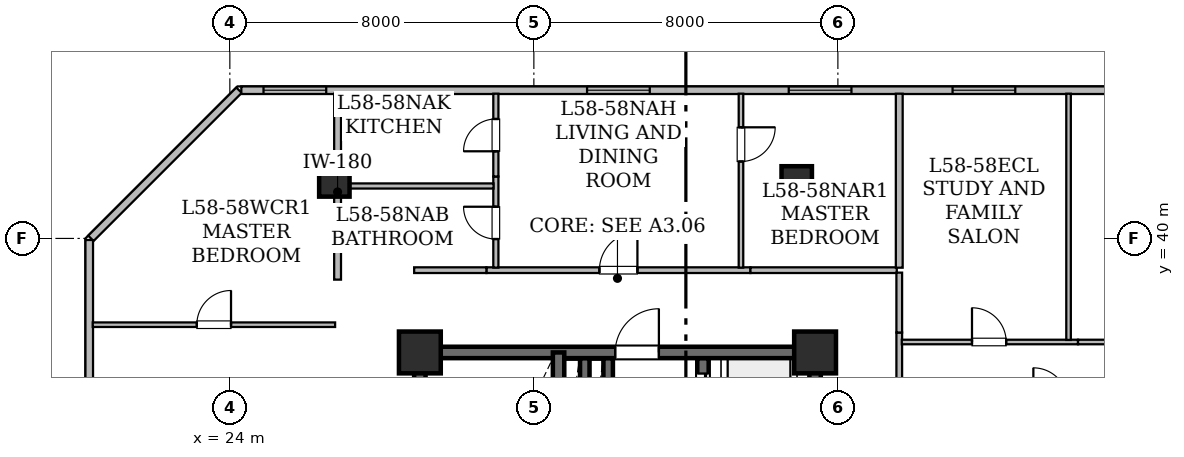
"""IFC4 building model, lengths in metres.
Left out: names, types, materials, properties, quantities, classifications, styles, units other than length and angle.
Written with IfcOpenShell. Run it as: python <this file> out.ifc"""

import sys

from ifc_helpers import new_model, si_unit, direction, frame, frame_2d, origin, origin_2d, place, context, subcontext, project, spatial, rectangle, hollow_rectangle, extrude, element, fill, save


model = new_model("IFC4")
c1 = context("Model", 3, precision=1e-05, world=origin(), true_north=direction((0.0, 1.0)))
c2 = subcontext(c1, "Body", "Model", "MODEL_VIEW")
j1 = project(units=[si_unit("LENGTHUNIT", "METRE"), si_unit("PLANEANGLEUNIT", "RADIAN")], contexts=[c1])
p1 = place(None, origin())
s1 = spatial("IfcSite", under=j1, at=p1, CompositionType="ELEMENT")
p2 = place(p1, origin())
s2 = spatial("IfcBuilding", under=s1, at=p2, CompositionType="ELEMENT")
p3 = place(p2, frame((0.0, 0.0, 228.15)))
s3 = spatial("IfcBuildingStorey", under=s2, at=p3, CompositionType="ELEMENT", Elevation=228.15)
for number, where, z_axis, x_axis in (
    (1, (29.0, 37.0, 0.0), (0.0, 0.0, 1.0), (1.0, 0.0, 0.0)),
    (2, (39.4, 37.0, 0.0), (0.0, 0.0, 1.0), (1.0, 0.0, 0.0)),
):
    element("IfcColumn", number, at=place(p3, frame(where, z_axis=z_axis, x_axis=x_axis)), inside=s3, PredefinedType="COLUMN", context=c2, shape_type="SweptSolid", body=[
        extrude(hollow_rectangle(XDim=1.1, YDim=1.1, WallThickness=0.055, at=origin_2d()), origin(), (0.0, 0.0, 1.0), 3.625),
    ])
for number, where, z_axis, x_axis in (
    (3, (26.75, 41.5, 0.0), (0.0, 0.0, 1.0), (1.0, 0.0, 0.0)),
    (4, (38.917, 41.5, 0.0), (0.0, 0.0, 1.0), (1.0, 0.0, 0.0)),
):
    element("IfcColumn", number, at=place(p3, frame(where, z_axis=z_axis, x_axis=x_axis)), inside=s3, PredefinedType="COLUMN", context=c2, shape_type="SweptSolid", body=[
        extrude(hollow_rectangle(XDim=0.8, YDim=0.8, WallThickness=0.04, at=origin_2d()), origin(), (0.0, 0.0, 1.0), 3.65),
    ])
p4 = place(p3, frame((20.3, 31.084, 0.0), z_axis=(0.0, 0.0, 1.0), x_axis=(0.0, 1.0, 0.0)))
e5 = element("IfcWall", 5, at=p4, inside=s3, PredefinedType="STANDARD", context=c2, shape_type="SweptSolid", body=[
    extrude(rectangle(XDim=8.875, YDim=0.2, at=frame_2d((4.438, 0.0))), origin(), (0.0, 0.0, 1.0), 3.43),
])
p5 = place(p4, frame((2.89, 0.0, 0.85)))
e6 = element("IfcOpeningElement", 6, at=p5, cuts=e5, PredefinedType="OPENING", context=c2, shape_type="SweptSolid", body=[
    extrude(rectangle(XDim=1.65, YDim=1.55, at=frame_2d((0.825, 0.775))), frame((0.0, 0.11, 0.0), z_axis=(0.0, -1.0, 0.0), x_axis=(1.0, 0.0, 0.0)), (0.0, 0.0, 1.0), 0.22),
])
p6 = place(p3, frame((20.344, 40.003, 0.0), z_axis=(0.0, 0.0, 1.0), x_axis=(0.707106781187, 0.707106781187, 0.0)))
e7 = element("IfcWall", 7, at=p6, inside=s3, PredefinedType="STANDARD", context=c2, shape_type="SweptSolid", body=[
    extrude(rectangle(XDim=5.511, YDim=0.2, at=frame_2d((2.756, 0.0))), origin(), (0.0, 0.0, 1.0), 3.43),
])
p7 = place(p3, frame((24.302, 43.9, 0.0), z_axis=(0.0, 0.0, 1.0), x_axis=(1.0, 0.0, 0.0)))
e8 = element("IfcWall", 8, at=p7, inside=s3, PredefinedType="STANDARD", context=c2, shape_type="SweptSolid", body=[
    extrude(rectangle(XDim=41.457, YDim=0.2, at=frame_2d((20.729, 0.0))), origin(), (0.0, 0.0, 1.0), 3.43),
])
p8 = place(p7, frame((0.584, 0.0, 0.85)))
e9 = element("IfcOpeningElement", 9, at=p8, cuts=e8, PredefinedType="OPENING", context=c2, shape_type="SweptSolid", body=[
    extrude(rectangle(XDim=1.65, YDim=1.55, at=frame_2d((0.825, 0.775))), frame((0.0, 0.11, 0.0), z_axis=(0.0, -1.0, 0.0), x_axis=(1.0, 0.0, 0.0)), (0.0, 0.0, 1.0), 0.22),
])
p9 = place(p7, frame((9.098, 0.0, 0.85)))
e10 = element("IfcOpeningElement", 10, at=p9, cuts=e8, PredefinedType="OPENING", context=c2, shape_type="SweptSolid", body=[
    extrude(rectangle(XDim=1.65, YDim=1.55, at=frame_2d((0.825, 0.775))), frame((0.0, 0.11, 0.0), z_axis=(0.0, -1.0, 0.0), x_axis=(1.0, 0.0, 0.0)), (0.0, 0.0, 1.0), 0.22),
])
p10 = place(p7, frame((14.405, 0.0, 0.85)))
e11 = element("IfcOpeningElement", 11, at=p10, cuts=e8, PredefinedType="OPENING", context=c2, shape_type="SweptSolid", body=[
    extrude(rectangle(XDim=1.65, YDim=1.55, at=frame_2d((0.825, 0.775))), frame((0.0, 0.11, 0.0), z_axis=(0.0, -1.0, 0.0), x_axis=(1.0, 0.0, 0.0)), (0.0, 0.0, 1.0), 0.22),
])
p11 = place(p7, frame((18.716, 0.0, 0.85)))
e12 = element("IfcOpeningElement", 12, at=p11, cuts=e8, PredefinedType="OPENING", context=c2, shape_type="SweptSolid", body=[
    extrude(rectangle(XDim=1.65, YDim=1.55, at=frame_2d((0.825, 0.775))), frame((0.0, 0.11, 0.0), z_axis=(0.0, -1.0, 0.0), x_axis=(1.0, 0.0, 0.0)), (0.0, 0.0, 1.0), 0.22),
])
p12 = place(p7, frame((23.643, 0.0, 0.85)))
e13 = element("IfcOpeningElement", 13, at=p12, cuts=e8, PredefinedType="OPENING", context=c2, shape_type="SweptSolid", body=[
    extrude(rectangle(XDim=1.65, YDim=1.55, at=frame_2d((0.825, 0.775))), frame((0.0, 0.11, 0.0), z_axis=(0.0, -1.0, 0.0), x_axis=(1.0, 0.0, 0.0)), (0.0, 0.0, 1.0), 0.22),
])
p13 = place(p7, frame((29.548, 0.0, 0.85)))
e14 = element("IfcOpeningElement", 14, at=p13, cuts=e8, PredefinedType="OPENING", context=c2, shape_type="SweptSolid", body=[
    extrude(rectangle(XDim=1.65, YDim=1.55, at=frame_2d((0.825, 0.775))), frame((0.0, 0.11, 0.0), z_axis=(0.0, -1.0, 0.0), x_axis=(1.0, 0.0, 0.0)), (0.0, 0.0, 1.0), 0.22),
])
p14 = place(p7, frame((36.3, 0.0, 0.85)))
e15 = element("IfcOpeningElement", 15, at=p14, cuts=e8, PredefinedType="OPENING", context=c2, shape_type="SweptSolid", body=[
    extrude(rectangle(XDim=1.65, YDim=1.55, at=frame_2d((0.825, 0.775))), frame((0.0, 0.11, 0.0), z_axis=(0.0, -1.0, 0.0), x_axis=(1.0, 0.0, 0.0)), (0.0, 0.0, 1.0), 0.22),
])
p15 = place(p3, frame((29.0, 28.0, 0.0), z_axis=(0.0, 0.0, 1.0), x_axis=(0.0, 1.0, 0.0)))
e16 = element("IfcWall", 16, at=p15, inside=s3, PredefinedType="SHEAR", context=c2, shape_type="SweptSolid", body=[
    extrude(rectangle(XDim=9.0, YDim=0.3, at=frame_2d((4.5, 0.0))), origin(), (0.0, 0.0, 1.0), 3.43),
])
p16 = place(p3, frame((29.0, 37.0, 0.0), z_axis=(0.0, 0.0, 1.0), x_axis=(1.0, 0.0, 0.0)))
e17 = element("IfcWall", 17, at=p16, inside=s3, PredefinedType="SHEAR", context=c2, shape_type="SweptSolid", body=[
    extrude(rectangle(XDim=10.4, YDim=0.3, at=frame_2d((5.2, 0.0))), origin(), (0.0, 0.0, 1.0), 3.43),
])
p17 = place(p16, frame((5.14, 0.0, 0.0)))
e18 = element("IfcOpeningElement", 18, at=p17, cuts=e17, PredefinedType="OPENING", context=c2, shape_type="SweptSolid", body=[
    extrude(rectangle(XDim=1.15, YDim=2.2, at=frame_2d((0.575, 1.1))), frame((0.0, 0.16, 0.0), z_axis=(0.0, -1.0, 0.0), x_axis=(1.0, 0.0, 0.0)), (0.0, 0.0, 1.0), 0.32),
])
p18 = place(p3, frame((39.4, 24.4, 0.0), z_axis=(0.0, 0.0, 1.0), x_axis=(0.0, 1.0, 0.0)))
e19 = element("IfcWall", 19, at=p18, inside=s3, PredefinedType="SHEAR", context=c2, shape_type="SweptSolid", body=[
    extrude(rectangle(XDim=12.6, YDim=0.3, at=frame_2d((6.3, 0.0))), origin(), (0.0, 0.0, 1.0), 3.43),
])
p19 = place(p3, frame((32.65, 28.0, 0.0), z_axis=(0.0, 0.0, 1.0), x_axis=(0.0, 1.0, 0.0)))
e20 = element("IfcWall", 20, at=p19, inside=s3, PredefinedType="SHEAR", context=c2, shape_type="SweptSolid", body=[
    extrude(rectangle(XDim=9.0, YDim=0.3, at=frame_2d((4.5, 0.0))), origin(), (0.0, 0.0, 1.0), 3.43),
])
p20 = place(p19, frame((0.72, 0.0, 0.0)))
e21 = element("IfcOpeningElement", 21, at=p20, cuts=e20, PredefinedType="OPENING", context=c2, shape_type="SweptSolid", body=[
    extrude(rectangle(XDim=1.0, YDim=2.15, at=frame_2d((0.5, 1.075))), frame((0.0, 0.16, 0.0), z_axis=(0.0, -1.0, 0.0), x_axis=(1.0, 0.0, 0.0)), (0.0, 0.0, 1.0), 0.32),
])
p21 = place(p3, frame((36.45, 31.3, 0.0), z_axis=(0.0, 0.0, 1.0), x_axis=(0.0, 1.0, 0.0)))
e22 = element("IfcWall", 22, at=p21, inside=s3, PredefinedType="SHEAR", context=c2, shape_type="SweptSolid", body=[
    extrude(rectangle(XDim=5.546, YDim=0.3, at=frame_2d((2.773, 0.0))), origin(), (0.0, 0.0, 1.0), 3.43),
])
p22 = place(p21, frame((0.12, 0.0, 0.0)))
e23 = element("IfcOpeningElement", 23, at=p22, cuts=e22, PredefinedType="OPENING", context=c2, shape_type="SweptSolid", body=[
    extrude(rectangle(XDim=1.05, YDim=2.15, at=frame_2d((0.525, 1.075))), frame((0.0, 0.16, 0.0), z_axis=(0.0, -1.0, 0.0), x_axis=(1.0, 0.0, 0.0)), (0.0, 0.0, 1.0), 0.32),
])
p23 = place(p21, frame((2.075, 0.0, 0.0)))
e24 = element("IfcOpeningElement", 24, at=p23, cuts=e22, PredefinedType="OPENING", context=c2, shape_type="SweptSolid", body=[
    extrude(rectangle(XDim=1.05, YDim=2.15, at=frame_2d((0.525, 1.075))), frame((0.0, 0.16, 0.0), z_axis=(0.0, -1.0, 0.0), x_axis=(1.0, 0.0, 0.0)), (0.0, 0.0, 1.0), 0.32),
])
p24 = place(p21, frame((4.095, 0.0, 0.0)))
e25 = element("IfcOpeningElement", 25, at=p24, cuts=e22, PredefinedType="OPENING", context=c2, shape_type="SweptSolid", body=[
    extrude(rectangle(XDim=1.05, YDim=2.15, at=frame_2d((0.525, 1.075))), frame((0.0, 0.16, 0.0), z_axis=(0.0, -1.0, 0.0), x_axis=(1.0, 0.0, 0.0)), (0.0, 0.0, 1.0), 0.32),
])
p25 = place(p3, frame((33.955, 34.025, 0.0), z_axis=(0.0, 0.0, 1.0), x_axis=(0.0, 1.0, 0.0)))
e26 = element("IfcWall", 26, at=p25, inside=s3, PredefinedType="SHEAR", context=c2, shape_type="SweptSolid", body=[
    extrude(rectangle(XDim=2.821, YDim=0.25, at=frame_2d((1.411, 0.0))), origin(), (0.0, 0.0, 1.0), 3.43),
])
p26 = place(p3, frame((33.34, 34.279, 0.0), z_axis=(0.0, 0.0, 1.0), x_axis=(0.0, 1.0, 0.0)))
e27 = element("IfcWall", 27, at=p26, inside=s3, PredefinedType="SHEAR", context=c2, shape_type="SweptSolid", body=[
    extrude(rectangle(XDim=2.567, YDim=0.25, at=frame_2d((1.283, 0.0))), origin(), (0.0, 0.0, 1.0), 3.43),
])
p27 = place(p3, frame((30.751, 39.165, 0.0), z_axis=(0.0, 0.0, 1.0), x_axis=(1.0, 0.0, 0.0)))
e28 = element("IfcWall", 28, at=p27, inside=s3, PredefinedType="STANDARD", context=c2, shape_type="SweptSolid", body=[
    extrude(rectangle(XDim=6.948, YDim=0.15, at=frame_2d((3.474, 0.0))), origin(), (0.0, 0.0, 1.0), 3.43),
])
p28 = place(p27, frame((2.974, 0.0, 0.0)))
e29 = element("IfcOpeningElement", 29, at=p28, cuts=e28, PredefinedType="OPENING", context=c2, shape_type="SweptSolid", body=[
    extrude(rectangle(XDim=1.0, YDim=2.15, at=frame_2d((0.5, 1.075))), frame((0.0, 0.085, 0.0), z_axis=(0.0, -1.0, 0.0), x_axis=(1.0, 0.0, 0.0)), (0.0, 0.0, 1.0), 0.17),
])
p29 = place(p3, frame((28.85, 39.165, 0.0), z_axis=(0.0, 0.0, 1.0), x_axis=(1.0, 0.0, 0.0)))
e30 = element("IfcWall", 30, at=p29, inside=s3, PredefinedType="STANDARD", context=c2, shape_type="SweptSolid", body=[
    extrude(rectangle(XDim=1.901, YDim=0.15, at=frame_2d((0.95, 0.0))), origin(), (0.0, 0.0, 1.0), 3.43),
])
p30 = place(p3, frame((37.699, 39.165, 0.0), z_axis=(0.0, 0.0, 1.0), x_axis=(1.0, 0.0, 0.0)))
e31 = element("IfcWall", 31, at=p30, inside=s3, PredefinedType="STANDARD", context=c2, shape_type="SweptSolid", body=[
    extrude(rectangle(XDim=3.851, YDim=0.15, at=frame_2d((1.926, 0.0))), origin(), (0.0, 0.0, 1.0), 2.725),
])
p31 = place(p3, frame((41.615, 37.524, 0.0), z_axis=(0.0, 0.0, 1.0), x_axis=(0.0, -1.0, 0.0)))
e32 = element("IfcWall", 32, at=p31, inside=s3, PredefinedType="STANDARD", context=c2, shape_type="SweptSolid", body=[
    extrude(rectangle(XDim=1.58, YDim=0.15, at=frame_2d((0.79, 0.0))), origin(), (0.0, 0.0, 1.0), 2.725),
])
p32 = place(p3, frame((41.615, 39.1, 0.0), z_axis=(0.0, 0.0, 1.0), x_axis=(0.0, -1.0, 0.0)))
e33 = element("IfcWall", 33, at=p32, inside=s3, PredefinedType="STANDARD", context=c2, shape_type="SweptSolid", body=[
    extrude(rectangle(XDim=1.576, YDim=0.15, at=frame_2d((0.788, 0.0))), origin(), (0.0, 0.0, 1.0), 2.725),
])
p33 = place(p3, frame((20.392, 37.73, 0.0), z_axis=(0.0, 0.0, 1.0), x_axis=(1.0, 0.0, 0.0)))
e34 = element("IfcWall", 34, at=p33, inside=s3, PredefinedType="PARTITIONING", context=c2, shape_type="SweptSolid", body=[
    extrude(rectangle(XDim=6.378, YDim=0.12, at=frame_2d((3.189, 0.0))), origin(), (0.0, 0.0, 1.0), 2.887),
])
p34 = place(p33, frame((2.739, 0.0, 0.0)))
e35 = element("IfcOpeningElement", 35, at=p34, cuts=e34, PredefinedType="OPENING", context=c2, shape_type="SweptSolid", body=[
    extrude(rectangle(XDim=0.9, YDim=2.1, at=frame_2d((0.45, 1.05))), frame((0.0, 0.07, 0.0), z_axis=(0.0, -1.0, 0.0), x_axis=(1.0, 0.0, 0.0)), (0.0, 0.0, 1.0), 0.14),
])
p35 = place(p3, frame((26.835, 41.629, 0.0), z_axis=(0.0, 0.0, 1.0), x_axis=(0.0, -1.0, 0.0)))
e36 = element("IfcWall", 36, at=p35, inside=s3, PredefinedType="STANDARD", context=c2, shape_type="SweptSolid", body=[
    extrude(rectangle(XDim=2.713, YDim=0.18, at=frame_2d((1.356, 0.0))), origin(), (0.0, 0.0, 1.0), 2.725),
])
p36 = place(p3, frame((26.835, 43.808, 0.0), z_axis=(0.0, 0.0, 1.0), x_axis=(0.0, -1.0, 0.0)))
e37 = element("IfcWall", 37, at=p36, inside=s3, PredefinedType="STANDARD", context=c2, shape_type="SweptSolid", body=[
    extrude(rectangle(XDim=2.179, YDim=0.18, at=frame_2d((1.09, 0.0))), origin(), (0.0, 0.0, 1.0), 2.725),
])
p37 = place(p3, frame((31.0, 39.232, 0.0), z_axis=(0.0, 0.0, 1.0), x_axis=(0.0, 1.0, 0.0)))
e38 = element("IfcWall", 38, at=p37, inside=s3, PredefinedType="PARTITIONING", context=c2, shape_type="SweptSolid", body=[
    extrude(rectangle(XDim=2.397, YDim=0.135, at=frame_2d((1.198, 0.0))), origin(), (0.0, 0.0, 1.0), 2.887),
])
p38 = place(p37, frame((0.752, 0.0, 0.0)))
e39 = element("IfcOpeningElement", 39, at=p38, cuts=e38, PredefinedType="OPENING", context=c2, shape_type="SweptSolid", body=[
    extrude(rectangle(XDim=0.85, YDim=2.1, at=frame_2d((0.425, 1.05))), frame((0.0, 0.077, 0.0), z_axis=(0.0, -1.0, 0.0), x_axis=(1.0, 0.0, 0.0)), (0.0, 0.0, 1.0), 0.155),
])
p39 = place(p3, frame((31.0, 41.629, 0.0), z_axis=(0.0, 0.0, 1.0), x_axis=(0.0, 1.0, 0.0)))
e40 = element("IfcWall", 40, at=p39, inside=s3, PredefinedType="PARTITIONING", context=c2, shape_type="SweptSolid", body=[
    extrude(rectangle(XDim=2.179, YDim=0.135, at=frame_2d((1.09, 0.0))), origin(), (0.0, 0.0, 1.0), 3.43),
])
p40 = place(p39, frame((0.664, 0.0, 0.0)))
e41 = element("IfcOpeningElement", 41, at=p40, cuts=e40, PredefinedType="OPENING", context=c2, shape_type="SweptSolid", body=[
    extrude(rectangle(XDim=0.85, YDim=2.1, at=frame_2d((0.425, 1.05))), frame((0.0, 0.077, 0.0), z_axis=(0.0, -1.0, 0.0), x_axis=(1.0, 0.0, 0.0)), (0.0, 0.0, 1.0), 0.155),
])
p41 = place(p3, frame((37.45, 43.808, 0.0), z_axis=(0.0, 0.0, 1.0), x_axis=(0.0, -1.0, 0.0)))
e42 = element("IfcWall", 42, at=p41, inside=s3, PredefinedType="PARTITIONING", context=c2, shape_type="SweptSolid", body=[
    extrude(rectangle(XDim=4.576, YDim=0.12, at=frame_2d((2.288, 0.0))), origin(), (0.0, 0.0, 1.0), 2.887),
])
p42 = place(p41, frame((0.884, 0.0, 0.0)))
e43 = element("IfcOpeningElement", 43, at=p42, cuts=e42, PredefinedType="OPENING", context=c2, shape_type="SweptSolid", body=[
    extrude(rectangle(XDim=0.9, YDim=2.1, at=frame_2d((0.45, 1.05))), frame((0.0, 0.07, 0.0), z_axis=(0.0, -1.0, 0.0), x_axis=(1.0, 0.0, 0.0)), (0.0, 0.0, 1.0), 0.14),
])
p43 = place(p3, frame((26.917, 41.38, 0.0), z_axis=(0.0, 0.0, 1.0), x_axis=(1.0, 0.0, 0.0)))
e44 = element("IfcWall", 44, at=p43, inside=s3, PredefinedType="PARTITIONING", context=c2, shape_type="SweptSolid", body=[
    extrude(rectangle(XDim=4.022, YDim=0.135, at=frame_2d((2.011, 0.0))), origin(), (0.0, 0.0, 1.0), 2.725),
])
p44 = place(p3, frame((41.615, 43.808, 0.0), z_axis=(0.0, 0.0, 1.0), x_axis=(0.0, -1.0, 0.0)))
e45 = element("IfcWall", 45, at=p44, inside=s3, PredefinedType="STANDARD", context=c2, shape_type="SweptSolid", body=[
    extrude(rectangle(XDim=4.578, YDim=0.18, at=frame_2d((2.289, 0.0))), origin(), (0.0, 0.0, 1.0), 2.887),
])
p45 = place(p3, frame((41.682, 37.275, 0.0), z_axis=(0.0, 0.0, 1.0), x_axis=(1.0, 0.0, 0.0)))
e46 = element("IfcWall", 46, at=p45, inside=s3, PredefinedType="PARTITIONING", context=c2, shape_type="SweptSolid", body=[
    extrude(rectangle(XDim=4.637, YDim=0.12, at=frame_2d((2.319, 0.0))), origin(), (0.0, 0.0, 1.0), 2.725),
])
p46 = place(p45, frame((1.847, 0.0, 0.0)))
e47 = element("IfcOpeningElement", 47, at=p46, cuts=e46, PredefinedType="OPENING", context=c2, shape_type="SweptSolid", body=[
    extrude(rectangle(XDim=0.9, YDim=2.1, at=frame_2d((0.45, 1.05))), frame((0.0, 0.07, 0.0), z_axis=(0.0, -1.0, 0.0), x_axis=(1.0, 0.0, 0.0)), (0.0, 0.0, 1.0), 0.14),
])
p47 = place(p3, frame((46.319, 37.275, 0.0), z_axis=(0.0, 0.0, 1.0), x_axis=(1.0, 0.0, 0.0)))
e48 = element("IfcWall", 48, at=p47, inside=s3, PredefinedType="PARTITIONING", context=c2, shape_type="SweptSolid", body=[
    extrude(rectangle(XDim=5.4, YDim=0.12, at=frame_2d((2.7, 0.0))), origin(), (0.0, 0.0, 1.0), 2.725),
])
p48 = place(p47, frame((2.229, 0.0, 0.0)))
e49 = element("IfcOpeningElement", 49, at=p48, cuts=e48, PredefinedType="OPENING", context=c2, shape_type="SweptSolid", body=[
    extrude(rectangle(XDim=0.9, YDim=2.1, at=frame_2d((0.45, 1.05))), frame((0.0, 0.07, 0.0), z_axis=(0.0, -1.0, 0.0), x_axis=(1.0, 0.0, 0.0)), (0.0, 0.0, 1.0), 0.14),
])
p49 = place(p3, frame((46.07, 43.808, 0.0), z_axis=(0.0, 0.0, 1.0), x_axis=(0.0, -1.0, 0.0)))
e50 = element("IfcWall", 50, at=p49, inside=s3, PredefinedType="PARTITIONING", context=c2, shape_type="SweptSolid", body=[
    extrude(rectangle(XDim=6.479, YDim=0.12, at=frame_2d((3.24, 0.0))), origin(), (0.0, 0.0, 1.0), 2.725),
])
p50 = place(p8, origin())
e51 = element("IfcWindow", 51, at=p50, inside=s3, PartitioningType="SINGLE_PANEL", PredefinedType="WINDOW", context=c2, shape_type="SweptSolid", body=[
    extrude(rectangle(XDim=1.65, YDim=1.55, at=frame_2d((0.825, 0.775))), frame((0.0, 0.03, 0.0), z_axis=(0.0, -1.0, 0.0), x_axis=(1.0, 0.0, 0.0)), (0.0, 0.0, 1.0), 0.06),
])
fill(e9, e51)
p51 = place(p9, origin())
e52 = element("IfcWindow", 52, at=p51, inside=s3, PartitioningType="SINGLE_PANEL", PredefinedType="WINDOW", context=c2, shape_type="SweptSolid", body=[
    extrude(rectangle(XDim=1.65, YDim=1.55, at=frame_2d((0.825, 0.775))), frame((0.0, 0.03, 0.0), z_axis=(0.0, -1.0, 0.0), x_axis=(1.0, 0.0, 0.0)), (0.0, 0.0, 1.0), 0.06),
])
fill(e10, e52)
p52 = place(p10, origin())
e53 = element("IfcWindow", 53, at=p52, inside=s3, PartitioningType="SINGLE_PANEL", PredefinedType="WINDOW", context=c2, shape_type="SweptSolid", body=[
    extrude(rectangle(XDim=1.65, YDim=1.55, at=frame_2d((0.825, 0.775))), frame((0.0, 0.03, 0.0), z_axis=(0.0, -1.0, 0.0), x_axis=(1.0, 0.0, 0.0)), (0.0, 0.0, 1.0), 0.06),
])
fill(e11, e53)
p53 = place(p11, origin())
e54 = element("IfcWindow", 54, at=p53, inside=s3, PartitioningType="SINGLE_PANEL", PredefinedType="WINDOW", context=c2, shape_type="SweptSolid", body=[
    extrude(rectangle(XDim=1.65, YDim=1.55, at=frame_2d((0.825, 0.775))), frame((0.0, 0.03, 0.0), z_axis=(0.0, -1.0, 0.0), x_axis=(1.0, 0.0, 0.0)), (0.0, 0.0, 1.0), 0.06),
])
fill(e12, e54)
p54 = place(p17, origin())
e55 = element("IfcDoor", 55, at=p54, inside=s3, OperationType="SINGLE_SWING_RIGHT", PredefinedType="DOOR", context=c2, shape_type="SweptSolid", body=[
    extrude(rectangle(XDim=1.15, YDim=2.2, at=frame_2d((0.575, 1.1))), frame((0.0, 0.025, 0.0), z_axis=(0.0, -1.0, 0.0), x_axis=(1.0, 0.0, 0.0)), (0.0, 0.0, 1.0), 0.05),
])
fill(e18, e55)
p55 = place(p24, origin())
e56 = element("IfcDoor", 56, at=p55, inside=s3, OperationType="SLIDING_TO_LEFT", PredefinedType="DOOR", context=c2, shape_type="SweptSolid", body=[
    extrude(rectangle(XDim=1.05, YDim=2.15, at=frame_2d((0.525, 1.075))), frame((0.0, 0.025, 0.0), z_axis=(0.0, -1.0, 0.0), x_axis=(1.0, 0.0, 0.0)), (0.0, 0.0, 1.0), 0.05),
])
fill(e25, e56)
p56 = place(p28, origin())
e57 = element("IfcDoor", 57, at=p56, inside=s3, OperationType="SINGLE_SWING_RIGHT", PredefinedType="DOOR", context=c2, shape_type="SweptSolid", body=[
    extrude(rectangle(XDim=1.0, YDim=2.15, at=frame_2d((0.5, 1.075))), frame((0.0, 0.025, 0.0), z_axis=(0.0, -1.0, 0.0), x_axis=(1.0, 0.0, 0.0)), (0.0, 0.0, 1.0), 0.05),
])
fill(e29, e57)
p57 = place(p34, origin())
e58 = element("IfcDoor", 58, at=p57, inside=s3, OperationType="SINGLE_SWING_RIGHT", PredefinedType="DOOR", context=c2, shape_type="SweptSolid", body=[
    extrude(rectangle(XDim=0.9, YDim=2.1, at=frame_2d((0.45, 1.05))), frame((0.0, 0.025, 0.0), z_axis=(0.0, -1.0, 0.0), x_axis=(1.0, 0.0, 0.0)), (0.0, 0.0, 1.0), 0.05),
])
fill(e35, e58)
p58 = place(p38, origin())
e59 = element("IfcDoor", 59, at=p58, inside=s3, OperationType="SINGLE_SWING_RIGHT", PredefinedType="DOOR", context=c2, shape_type="SweptSolid", body=[
    extrude(rectangle(XDim=0.85, YDim=2.1, at=frame_2d((0.425, 1.05))), frame((0.0, 0.025, 0.0), z_axis=(0.0, -1.0, 0.0), x_axis=(1.0, 0.0, 0.0)), (0.0, 0.0, 1.0), 0.05),
])
fill(e39, e59)
p59 = place(p40, origin())
e60 = element("IfcDoor", 60, at=p59, inside=s3, OperationType="SINGLE_SWING_LEFT", PredefinedType="DOOR", context=c2, shape_type="SweptSolid", body=[
    extrude(rectangle(XDim=0.85, YDim=2.1, at=frame_2d((0.425, 1.05))), frame((0.0, 0.025, 0.0), z_axis=(0.0, -1.0, 0.0), x_axis=(1.0, 0.0, 0.0)), (0.0, 0.0, 1.0), 0.05),
])
fill(e41, e60)
p60 = place(p42, origin())
e61 = element("IfcDoor", 61, at=p60, inside=s3, OperationType="SINGLE_SWING_LEFT", PredefinedType="DOOR", context=c2, shape_type="SweptSolid", body=[
    extrude(rectangle(XDim=0.9, YDim=2.1, at=frame_2d((0.45, 1.05))), frame((0.0, 0.025, 0.0), z_axis=(0.0, -1.0, 0.0), x_axis=(1.0, 0.0, 0.0)), (0.0, 0.0, 1.0), 0.05),
])
fill(e43, e61)
p61 = place(p46, origin())
e62 = element("IfcDoor", 62, at=p61, inside=s3, OperationType="SINGLE_SWING_LEFT", PredefinedType="DOOR", context=c2, shape_type="SweptSolid", body=[
    extrude(rectangle(XDim=0.9, YDim=2.1, at=frame_2d((0.45, 1.05))), frame((0.0, 0.025, 0.0), z_axis=(0.0, -1.0, 0.0), x_axis=(1.0, 0.0, 0.0)), (0.0, 0.0, 1.0), 0.05),
])
fill(e47, e62)
save(model, sys.argv[1])
